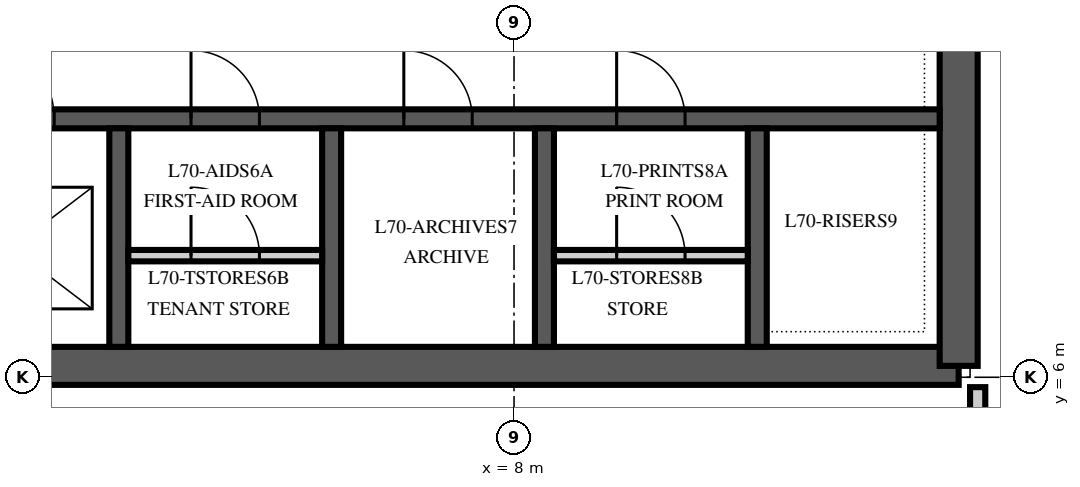
"""IFC4 building model, lengths in metres.
Left out: names, types, materials, properties, quantities, classifications, styles, units other than length and angle.
Written with IfcOpenShell. Run it as: python <this file> out.ifc"""

import sys

from ifc_helpers import new_model, si_unit, direction, frame, frame_2d, origin, place, context, subcontext, project, spatial, polyline, rectangle, outline, extrude, element, fill, save


model = new_model("IFC4")
c1 = context("Model", 3, precision=1e-05, world=origin(), true_north=direction((0.0, 1.0)))
c2 = subcontext(c1, "Body", "Model", "MODEL_VIEW")
j1 = project(units=[si_unit("LENGTHUNIT", "METRE"), si_unit("PLANEANGLEUNIT", "RADIAN")], contexts=[c1])
p1 = place(None, origin())
s1 = spatial("IfcSite", under=j1, at=p1, CompositionType="ELEMENT")
p2 = place(p1, origin())
s2 = spatial("IfcBuilding", under=s1, at=p2, CompositionType="ELEMENT")
p3 = place(p2, frame((0.0, 0.0, 300.0)))
s3 = spatial("IfcBuildingStorey", under=s2, at=p3, CompositionType="ELEMENT", Elevation=300.0)
p4 = place(p3, frame((-13.85, 6.15, 0.0), z_axis=(0.0, 0.0, 1.0), x_axis=(1.0, 0.0, 0.0)))
e1 = element("IfcWall", 1, at=p4, inside=s3, PredefinedType="SHEAR", context=c2, shape_type="SweptSolid", body=[
    extrude(rectangle(XDim=27.7, YDim=0.5, at=frame_2d((13.85, 0.0))), origin(), (0.0, 0.0, 1.0), 4.0),
])
p5 = place(p3, frame((13.85, 6.15, 0.0), z_axis=(0.0, 0.0, 1.0), x_axis=(0.0, 1.0, 0.0)))
e2 = element("IfcWall", 2, at=p5, inside=s3, PredefinedType="SHEAR", context=c2, shape_type="SweptSolid", body=[
    extrude(outline(polyline([(0.0, -0.25), (17.7, -0.25), (17.7, 0.0), (17.45, 0.0), (17.45, 0.25), (0.25, 0.25), (0.25, 0.0), (0.0, 0.0), (0.0, -0.25)])), origin(), (0.0, 0.0, 1.0), 4.0),
])
p6 = place(p5, frame((4.15, 0.0, 0.0)))
e3 = element("IfcOpeningElement", 3, at=p6, cuts=e2, PredefinedType="OPENING", context=c2, shape_type="SweptSolid", body=[
    extrude(rectangle(XDim=1.8, YDim=2.4, at=frame_2d((0.9, 1.2))), frame((0.0, 0.265, 0.0), z_axis=(0.0, -1.0, 0.0), x_axis=(1.0, 0.0, 0.0)), (0.0, 0.0, 1.0), 0.53),
])
p7 = place(p3, frame((-13.6, 9.4, 0.0), z_axis=(0.0, 0.0, 1.0), x_axis=(1.0, 0.0, 0.0)))
e4 = element("IfcWall", 4, at=p7, inside=s3, PredefinedType="SHEAR", context=c2, shape_type="SweptSolid", body=[
    extrude(rectangle(XDim=27.2, YDim=0.25, at=frame_2d((13.6, 0.0))), origin(), (0.0, 0.0, 1.0), 4.0),
])
p8 = place(p7, frame((8.85, 0.0, 0.0)))
e5 = element("IfcOpeningElement", 5, at=p8, cuts=e4, PredefinedType="OPENING", context=c2, shape_type="SweptSolid", body=[
    extrude(rectangle(XDim=1.1, YDim=2.1, at=frame_2d((0.55, 1.05))), frame((0.0, 0.14, 0.0), z_axis=(0.0, -1.0, 0.0), x_axis=(1.0, 0.0, 0.0)), (0.0, 0.0, 1.0), 0.28),
])
p9 = place(p7, frame((11.65, 0.0, 0.0)))
e6 = element("IfcOpeningElement", 6, at=p9, cuts=e4, PredefinedType="OPENING", context=c2, shape_type="SweptSolid", body=[
    extrude(rectangle(XDim=1.1, YDim=2.1, at=frame_2d((0.55, 1.05))), frame((0.0, 0.14, 0.0), z_axis=(0.0, -1.0, 0.0), x_axis=(1.0, 0.0, 0.0)), (0.0, 0.0, 1.0), 0.28),
])
p10 = place(p7, frame((14.45, 0.0, 0.0)))
e7 = element("IfcOpeningElement", 7, at=p10, cuts=e4, PredefinedType="OPENING", context=c2, shape_type="SweptSolid", body=[
    extrude(rectangle(XDim=1.1, YDim=2.1, at=frame_2d((0.55, 1.05))), frame((0.0, 0.14, 0.0), z_axis=(0.0, -1.0, 0.0), x_axis=(1.0, 0.0, 0.0)), (0.0, 0.0, 1.0), 0.28),
])
p11 = place(p7, frame((0.55, 0.0, 0.0)))
e8 = element("IfcOpeningElement", 8, at=p11, cuts=e4, PredefinedType="OPENING", context=c2, shape_type="SweptSolid", body=[
    extrude(rectangle(XDim=0.9, YDim=2.1, at=frame_2d((0.45, 1.05))), frame((0.0, 0.14, 0.0), z_axis=(0.0, -1.0, 0.0), x_axis=(1.0, 0.0, 0.0)), (0.0, 0.0, 1.0), 0.28),
])
p12 = place(p7, frame((3.35, 0.0, 0.0)))
e9 = element("IfcOpeningElement", 9, at=p12, cuts=e4, PredefinedType="OPENING", context=c2, shape_type="SweptSolid", body=[
    extrude(rectangle(XDim=0.9, YDim=2.1, at=frame_2d((0.45, 1.05))), frame((0.0, 0.14, 0.0), z_axis=(0.0, -1.0, 0.0), x_axis=(1.0, 0.0, 0.0)), (0.0, 0.0, 1.0), 0.28),
])
p13 = place(p7, frame((6.15, 0.0, 0.0)))
e10 = element("IfcOpeningElement", 10, at=p13, cuts=e4, PredefinedType="OPENING", context=c2, shape_type="SweptSolid", body=[
    extrude(rectangle(XDim=0.9, YDim=2.1, at=frame_2d((0.45, 1.05))), frame((0.0, 0.14, 0.0), z_axis=(0.0, -1.0, 0.0), x_axis=(1.0, 0.0, 0.0)), (0.0, 0.0, 1.0), 0.28),
])
p14 = place(p7, frame((17.35, 0.0, 0.0)))
e11 = element("IfcOpeningElement", 11, at=p14, cuts=e4, PredefinedType="OPENING", context=c2, shape_type="SweptSolid", body=[
    extrude(rectangle(XDim=0.9, YDim=2.1, at=frame_2d((0.45, 1.05))), frame((0.0, 0.14, 0.0), z_axis=(0.0, -1.0, 0.0), x_axis=(1.0, 0.0, 0.0)), (0.0, 0.0, 1.0), 0.28),
])
p15 = place(p7, frame((20.15, 0.0, 0.0)))
e12 = element("IfcOpeningElement", 12, at=p15, cuts=e4, PredefinedType="OPENING", context=c2, shape_type="SweptSolid", body=[
    extrude(rectangle(XDim=0.9, YDim=2.1, at=frame_2d((0.45, 1.05))), frame((0.0, 0.14, 0.0), z_axis=(0.0, -1.0, 0.0), x_axis=(1.0, 0.0, 0.0)), (0.0, 0.0, 1.0), 0.28),
])
p16 = place(p7, frame((22.95, 0.0, 0.0)))
e13 = element("IfcOpeningElement", 13, at=p16, cuts=e4, PredefinedType="OPENING", context=c2, shape_type="SweptSolid", body=[
    extrude(rectangle(XDim=0.9, YDim=2.1, at=frame_2d((0.45, 1.05))), frame((0.0, 0.14, 0.0), z_axis=(0.0, -1.0, 0.0), x_axis=(1.0, 0.0, 0.0)), (0.0, 0.0, 1.0), 0.28),
])
for number, where, z_axis, x_axis in (
    (14, (2.8, 6.4, 0.0), (0.0, 0.0, 1.0), (0.0, 1.0, 0.0)),
    (15, (5.6, 6.4, 0.0), (0.0, 0.0, 1.0), (0.0, 1.0, 0.0)),
    (16, (8.4, 6.4, 0.0), (0.0, 0.0, 1.0), (0.0, 1.0, 0.0)),
    (17, (11.2, 6.4, 0.0), (0.0, 0.0, 1.0), (0.0, 1.0, 0.0)),
):
    element("IfcWall", number, at=place(p3, frame(where, z_axis=z_axis, x_axis=x_axis)), inside=s3, PredefinedType="SHEAR", context=c2, shape_type="SweptSolid", body=[
        extrude(rectangle(XDim=2.875, YDim=0.25, at=frame_2d((1.438, 0.0))), origin(), (0.0, 0.0, 1.0), 4.0),
    ])
p17 = place(p3, frame((2.925, 7.6, 0.0), z_axis=(0.0, 0.0, 1.0), x_axis=(1.0, 0.0, 0.0)))
e18 = element("IfcWall", 18, at=p17, inside=s3, PredefinedType="PARTITIONING", context=c2, shape_type="SweptSolid", body=[
    extrude(rectangle(XDim=2.55, YDim=0.15, at=frame_2d((1.275, 0.0))), origin(), (0.0, 0.0, 1.0), 3.85),
])
p18 = place(p17, frame((0.825, 0.0, 0.0)))
e19 = element("IfcOpeningElement", 19, at=p18, cuts=e18, PredefinedType="OPENING", context=c2, shape_type="SweptSolid", body=[
    extrude(rectangle(XDim=0.9, YDim=2.1, at=frame_2d((0.45, 1.05))), frame((0.0, 0.09, 0.0), z_axis=(0.0, -1.0, 0.0), x_axis=(1.0, 0.0, 0.0)), (0.0, 0.0, 1.0), 0.18),
])
p19 = place(p3, frame((8.525, 7.6, 0.0), z_axis=(0.0, 0.0, 1.0), x_axis=(1.0, 0.0, 0.0)))
e20 = element("IfcWall", 20, at=p19, inside=s3, PredefinedType="PARTITIONING", context=c2, shape_type="SweptSolid", body=[
    extrude(rectangle(XDim=2.55, YDim=0.15, at=frame_2d((1.275, 0.0))), origin(), (0.0, 0.0, 1.0), 3.85),
])
p20 = place(p19, frame((0.825, 0.0, 0.0)))
e21 = element("IfcOpeningElement", 21, at=p20, cuts=e20, PredefinedType="OPENING", context=c2, shape_type="SweptSolid", body=[
    extrude(rectangle(XDim=0.9, YDim=2.1, at=frame_2d((0.45, 1.05))), frame((0.0, 0.09, 0.0), z_axis=(0.0, -1.0, 0.0), x_axis=(1.0, 0.0, 0.0)), (0.0, 0.0, 1.0), 0.18),
])
p21 = place(p3, frame((14.1, 4.05, 0.0), z_axis=(0.0, 0.0, 1.0), x_axis=(0.0, 1.0, 0.0)))
e22 = element("IfcWall", 22, at=p21, inside=s3, PredefinedType="PARTITIONING", context=c2, shape_type="SweptSolid", body=[
    extrude(rectangle(XDim=1.82, YDim=0.2, at=frame_2d((0.91, 0.0))), origin(), (0.0, 0.0, 1.0), 3.85),
])
p22 = place(p10, origin())
e23 = element("IfcDoor", 23, at=p22, inside=s3, OperationType="SLIDING_TO_LEFT", PredefinedType="DOOR", context=c2, shape_type="SweptSolid", body=[
    extrude(rectangle(XDim=1.1, YDim=2.1, at=frame_2d((0.55, 1.05))), frame((0.0, 0.125, 0.0), z_axis=(0.0, -1.0, 0.0), x_axis=(1.0, 0.0, 0.0)), (0.0, 0.0, 1.0), 0.25),
])
fill(e7, e23)
p23 = place(p14, origin())
e24 = element("IfcDoor", 24, at=p23, inside=s3, OperationType="SINGLE_SWING_LEFT", PredefinedType="DOOR", context=c2, shape_type="SweptSolid", body=[
    extrude(rectangle(XDim=0.9, YDim=2.1, at=frame_2d((0.45, 1.05))), frame((0.0, 0.125, 0.0), z_axis=(0.0, -1.0, 0.0), x_axis=(1.0, 0.0, 0.0)), (0.0, 0.0, 1.0), 0.25),
])
fill(e11, e24)
p24 = place(p18, origin())
e25 = element("IfcDoor", 25, at=p24, inside=s3, OperationType="SINGLE_SWING_LEFT", PredefinedType="DOOR", context=c2, shape_type="SweptSolid", body=[
    extrude(rectangle(XDim=0.9, YDim=2.1, at=frame_2d((0.45, 1.05))), frame((0.0, 0.075, 0.0), z_axis=(0.0, -1.0, 0.0), x_axis=(1.0, 0.0, 0.0)), (0.0, 0.0, 1.0), 0.149),
])
fill(e19, e25)
p25 = place(p15, origin())
e26 = element("IfcDoor", 26, at=p25, inside=s3, OperationType="SINGLE_SWING_LEFT", PredefinedType="DOOR", context=c2, shape_type="SweptSolid", body=[
    extrude(rectangle(XDim=0.9, YDim=2.1, at=frame_2d((0.45, 1.05))), frame((0.0, 0.125, 0.0), z_axis=(0.0, -1.0, 0.0), x_axis=(1.0, 0.0, 0.0)), (0.0, 0.0, 1.0), 0.25),
])
fill(e12, e26)
p26 = place(p16, origin())
e27 = element("IfcDoor", 27, at=p26, inside=s3, OperationType="SINGLE_SWING_LEFT", PredefinedType="DOOR", context=c2, shape_type="SweptSolid", body=[
    extrude(rectangle(XDim=0.9, YDim=2.1, at=frame_2d((0.45, 1.05))), frame((0.0, 0.125, 0.0), z_axis=(0.0, -1.0, 0.0), x_axis=(1.0, 0.0, 0.0)), (0.0, 0.0, 1.0), 0.25),
])
fill(e13, e27)
p27 = place(p20, origin())
e28 = element("IfcDoor", 28, at=p27, inside=s3, OperationType="SINGLE_SWING_LEFT", PredefinedType="DOOR", context=c2, shape_type="SweptSolid", body=[
    extrude(rectangle(XDim=0.9, YDim=2.1, at=frame_2d((0.45, 1.05))), frame((0.0, 0.075, 0.0), z_axis=(0.0, -1.0, 0.0), x_axis=(1.0, 0.0, 0.0)), (0.0, 0.0, 1.0), 0.149),
])
fill(e21, e28)
save(model, sys.argv[1])
